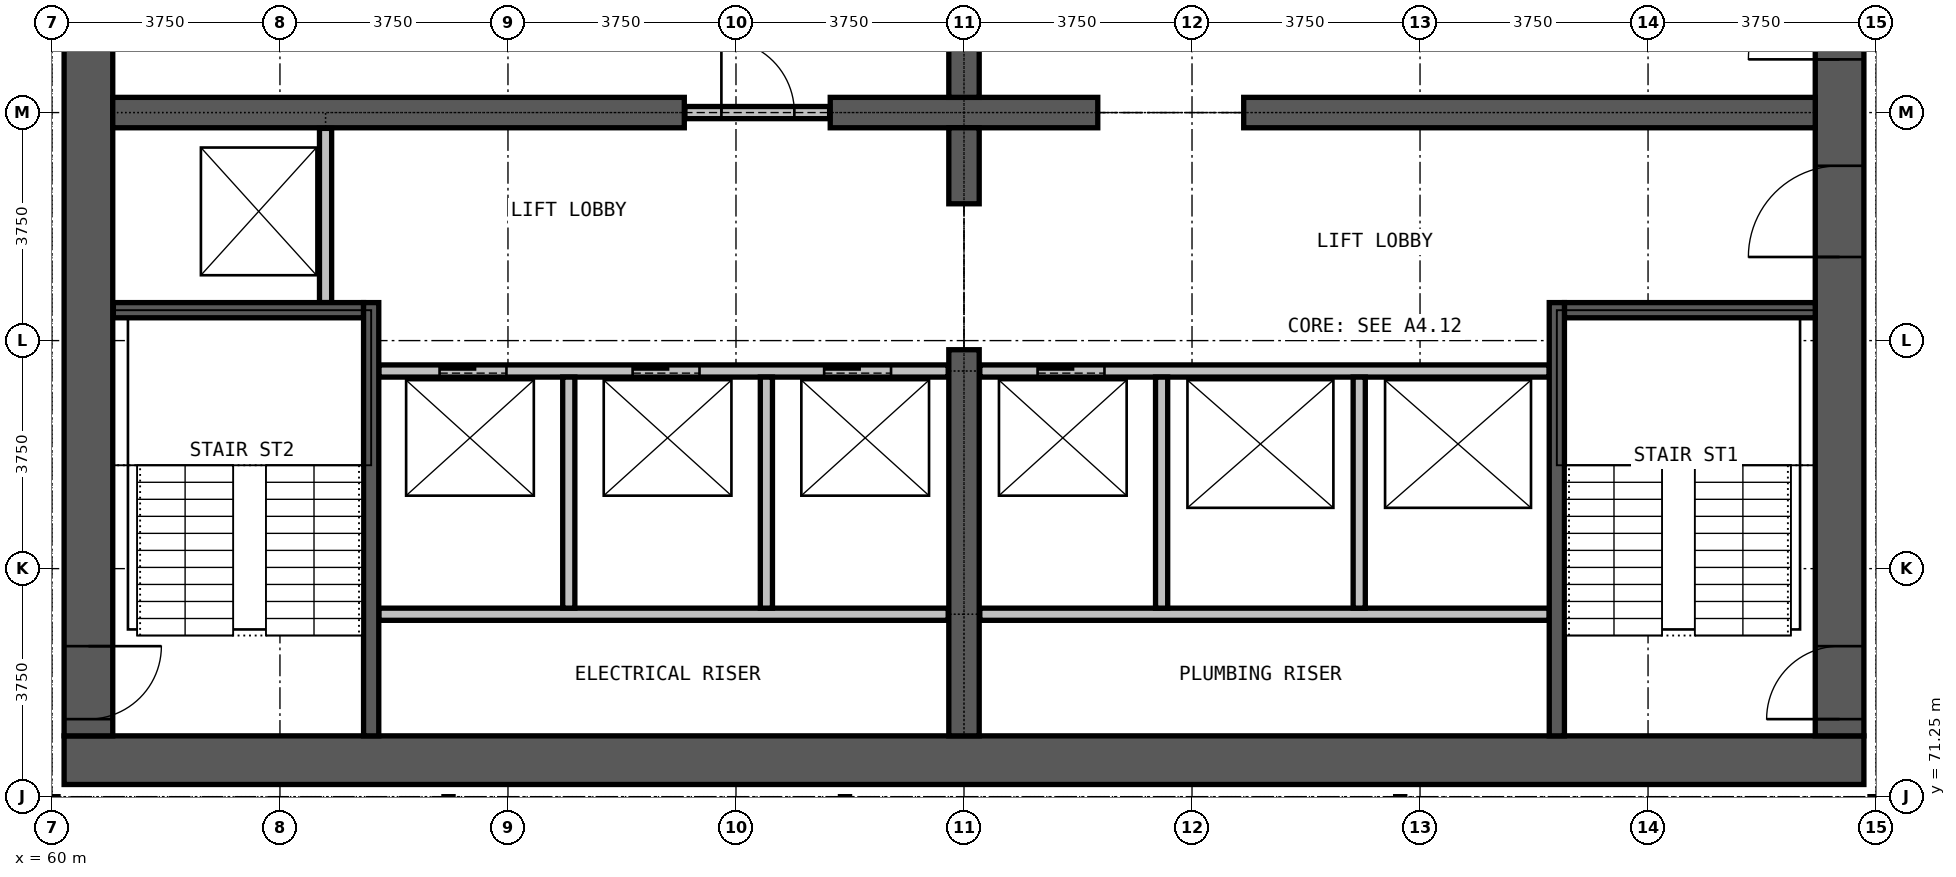
"""IFC4 building model, lengths in metres.
Left out: names, types, materials, properties, quantities, classifications, styles, units other than length and angle.
Written with IfcOpenShell. Run it as: python <this file> out.ifc"""

import sys

from ifc_helpers import new_model, si_unit, direction, frame, frame_2d, origin, place, context, subcontext, project, spatial, rectangle, extrude, element, fill, save


model = new_model("IFC4")
c1 = context("Model", 3, precision=1e-05, world=origin(), true_north=direction((0.0, 1.0)))
c2 = subcontext(c1, "Body", "Model", "MODEL_VIEW")
j1 = project(units=[si_unit("LENGTHUNIT", "METRE"), si_unit("PLANEANGLEUNIT", "RADIAN")], contexts=[c1])
p1 = place(None, origin())
s1 = spatial("IfcSite", under=j1, at=p1, CompositionType="ELEMENT")
p2 = place(p1, origin())
s2 = spatial("IfcBuilding", under=s1, at=p2, CompositionType="ELEMENT")
p3 = place(p2, frame((0.0, 0.0, 136.0)))
s3 = spatial("IfcBuildingStorey", under=s2, at=p3, CompositionType="ELEMENT", Elevation=136.0)
p4 = place(p3, frame((60.2, 71.85, 0.0), z_axis=(0.0, 0.0, 1.0), x_axis=(1.0, 0.0, 0.0)))
e1 = element("IfcWall", 1, at=p4, inside=s3, PredefinedType="SHEAR", context=c2, shape_type="SweptSolid", body=[
    extrude(rectangle(XDim=29.6, YDim=0.8, at=frame_2d((14.8, 0.0))), origin(), (0.0, 0.0, 1.0), 3.6),
])
p5 = place(p3, frame((89.4, 72.25, 0.0), z_axis=(0.0, 0.0, 1.0), x_axis=(0.0, 1.0, 0.0)))
e2 = element("IfcWall", 2, at=p5, inside=s3, PredefinedType="SHEAR", context=c2, shape_type="SweptSolid", body=[
    extrude(rectangle(XDim=20.5, YDim=0.8, at=frame_2d((10.25, 0.0))), origin(), (0.0, 0.0, 1.0), 3.6),
])
p6 = place(p5, frame((0.275, 0.0, 0.0)))
e3 = element("IfcOpeningElement", 3, at=p6, cuts=e2, PredefinedType="OPENING", context=c2, shape_type="SweptSolid", body=[
    extrude(rectangle(XDim=1.2, YDim=2.2, at=frame_2d((0.6, 1.1))), frame((0.0, 0.41, 0.0), z_axis=(0.0, -1.0, 0.0), x_axis=(1.0, 0.0, 0.0)), (0.0, 0.0, 1.0), 0.82),
])
p7 = place(p5, frame((13.775, 0.0, 0.0)))
e4 = element("IfcOpeningElement", 4, at=p7, cuts=e2, PredefinedType="OPENING", context=c2, shape_type="SweptSolid", body=[
    extrude(rectangle(XDim=1.2, YDim=2.2, at=frame_2d((0.6, 1.1))), frame((0.0, 0.41, 0.0), z_axis=(0.0, -1.0, 0.0), x_axis=(1.0, 0.0, 0.0)), (0.0, 0.0, 1.0), 0.82),
])
p8 = place(p5, frame((7.875, 0.0, 0.0)))
e5 = element("IfcOpeningElement", 5, at=p8, cuts=e2, PredefinedType="OPENING", context=c2, shape_type="SweptSolid", body=[
    extrude(rectangle(XDim=1.5, YDim=2.2, at=frame_2d((0.75, 1.1))), frame((0.0, 0.41, 0.0), z_axis=(0.0, -1.0, 0.0), x_axis=(1.0, 0.0, 0.0)), (0.0, 0.0, 1.0), 0.82),
])
p9 = place(p5, frame((11.125, 0.0, 0.0)))
e6 = element("IfcOpeningElement", 6, at=p9, cuts=e2, PredefinedType="OPENING", context=c2, shape_type="SweptSolid", body=[
    extrude(rectangle(XDim=1.5, YDim=2.2, at=frame_2d((0.75, 1.1))), frame((0.0, 0.41, 0.0), z_axis=(0.0, -1.0, 0.0), x_axis=(1.0, 0.0, 0.0)), (0.0, 0.0, 1.0), 0.82),
])
p10 = place(p3, frame((60.6, 92.75, 0.0), z_axis=(0.0, 0.0, 1.0), x_axis=(0.0, -1.0, 0.0)))
e7 = element("IfcWall", 7, at=p10, inside=s3, PredefinedType="SHEAR", context=c2, shape_type="SweptSolid", body=[
    extrude(rectangle(XDim=20.5, YDim=0.8, at=frame_2d((10.25, 0.0))), origin(), (0.0, 0.0, 1.0), 3.6),
])
p11 = place(p10, frame((19.025, 0.0, 0.0)))
e8 = element("IfcOpeningElement", 8, at=p11, cuts=e7, PredefinedType="OPENING", context=c2, shape_type="SweptSolid", body=[
    extrude(rectangle(XDim=1.2, YDim=2.2, at=frame_2d((0.6, 1.1))), frame((0.0, 0.41, 0.0), z_axis=(0.0, -1.0, 0.0), x_axis=(1.0, 0.0, 0.0)), (0.0, 0.0, 1.0), 0.82),
])
p12 = place(p10, frame((8.025, 0.0, 0.0)))
e9 = element("IfcOpeningElement", 9, at=p12, cuts=e7, PredefinedType="OPENING", context=c2, shape_type="SweptSolid", body=[
    extrude(rectangle(XDim=1.2, YDim=2.2, at=frame_2d((0.6, 1.1))), frame((0.0, 0.41, 0.0), z_axis=(0.0, -1.0, 0.0), x_axis=(1.0, 0.0, 0.0)), (0.0, 0.0, 1.0), 0.82),
])
p13 = place(p3, frame((61.0, 82.5, 0.0), z_axis=(0.0, 0.0, 1.0), x_axis=(1.0, 0.0, 0.0)))
e10 = element("IfcWall", 10, at=p13, inside=s3, PredefinedType="SHEAR", context=c2, shape_type="SweptSolid", body=[
    extrude(rectangle(XDim=9.4, YDim=0.5, at=frame_2d((4.7, 0.0))), origin(), (0.0, 0.0, 1.0), 3.6),
])
p14 = place(p3, frame((72.8, 82.5, 0.0), z_axis=(0.0, 0.0, 1.0), x_axis=(1.0, 0.0, 0.0)))
e11 = element("IfcWall", 11, at=p14, inside=s3, PredefinedType="SHEAR", context=c2, shape_type="SweptSolid", body=[
    extrude(rectangle(XDim=4.4, YDim=0.5, at=frame_2d((2.2, 0.0))), origin(), (0.0, 0.0, 1.0), 3.6),
])
p15 = place(p3, frame((79.6, 82.5, 0.0), z_axis=(0.0, 0.0, 1.0), x_axis=(1.0, 0.0, 0.0)))
e12 = element("IfcWall", 12, at=p15, inside=s3, PredefinedType="SHEAR", context=c2, shape_type="SweptSolid", body=[
    extrude(rectangle(XDim=9.4, YDim=0.5, at=frame_2d((4.7, 0.0))), origin(), (0.0, 0.0, 1.0), 3.6),
])
p16 = place(p3, frame((75.0, 72.25, 0.0), z_axis=(0.0, 0.0, 1.0), x_axis=(0.0, 1.0, 0.0)))
e13 = element("IfcWall", 13, at=p16, inside=s3, PredefinedType="SHEAR", context=c2, shape_type="SweptSolid", body=[
    extrude(rectangle(XDim=6.35, YDim=0.5, at=frame_2d((3.175, 0.0))), origin(), (0.0, 0.0, 1.0), 3.6),
])
for number, where, z_axis, x_axis in (
    (14, (75.0, 81.0, 0.0), (0.0, 0.0, 1.0), (0.0, 1.0, 0.0)),
    (15, (75.0, 82.75, 0.0), (0.0, 0.0, 1.0), (0.0, 1.0, 0.0)),
):
    element("IfcWall", number, at=place(p3, frame(where, z_axis=z_axis, x_axis=x_axis)), inside=s3, PredefinedType="SHEAR", context=c2, shape_type="SweptSolid", body=[
        extrude(rectangle(XDim=1.25, YDim=0.5, at=frame_2d((0.625, 0.0))), origin(), (0.0, 0.0, 1.0), 3.6),
    ])
p17 = place(p3, frame((70.41, 82.5, 0.0), z_axis=(0.0, 0.0, 1.0), x_axis=(1.0, 0.0, 0.0)))
e16 = element("IfcWall", 16, at=p17, inside=s3, PredefinedType="PARTITIONING", context=c2, shape_type="SweptSolid", body=[
    extrude(rectangle(XDim=2.38, YDim=0.2, at=frame_2d((1.19, 0.0))), origin(), (0.0, 0.0, 1.0), 2.4),
])
p18 = place(p17, frame((0.6, 0.0, 0.0)))
e17 = element("IfcOpeningElement", 17, at=p18, cuts=e16, PredefinedType="OPENING", context=c2, shape_type="SweptSolid", body=[
    extrude(rectangle(XDim=1.2, YDim=2.2, at=frame_2d((0.6, 1.1))), frame((0.0, 0.11, 0.0), z_axis=(0.0, -1.0, 0.0), x_axis=(1.0, 0.0, 0.0)), (0.0, 0.0, 1.0), 0.22),
])
for number, where, z_axis, x_axis in (
    (18, (65.375, 74.25, 0.0), (0.0, 0.0, 1.0), (1.0, 0.0, 0.0)),
    (19, (75.26, 74.25, 0.0), (0.0, 0.0, 1.0), (1.0, 0.0, 0.0)),
):
    element("IfcWall", number, at=place(p3, frame(where, z_axis=z_axis, x_axis=x_axis)), inside=s3, PredefinedType="PARTITIONING", context=c2, shape_type="SweptSolid", body=[
        extrude(rectangle(XDim=9.365, YDim=0.2, at=frame_2d((4.683, 0.0))), origin(), (0.0, 0.0, 1.0), 3.3),
    ])
p19 = place(p3, frame((65.375, 78.25, 0.0), z_axis=(0.0, 0.0, 1.0), x_axis=(1.0, 0.0, 0.0)))
e20 = element("IfcWall", 20, at=p19, inside=s3, PredefinedType="PARTITIONING", context=c2, shape_type="SweptSolid", body=[
    extrude(rectangle(XDim=9.365, YDim=0.2, at=frame_2d((4.683, 0.0))), origin(), (0.0, 0.0, 1.0), 3.3),
])
p20 = place(p19, frame((1.0, 0.0, 0.0)))
e21 = element("IfcOpeningElement", 21, at=p20, cuts=e20, PredefinedType="OPENING", context=c2, shape_type="SweptSolid", body=[
    extrude(rectangle(XDim=1.1, YDim=2.2, at=frame_2d((0.55, 1.1))), frame((0.0, 0.11, 0.0), z_axis=(0.0, -1.0, 0.0), x_axis=(1.0, 0.0, 0.0)), (0.0, 0.0, 1.0), 0.22),
])
p21 = place(p19, frame((4.175, 0.0, 0.0)))
e22 = element("IfcOpeningElement", 22, at=p21, cuts=e20, PredefinedType="OPENING", context=c2, shape_type="SweptSolid", body=[
    extrude(rectangle(XDim=1.1, YDim=2.2, at=frame_2d((0.55, 1.1))), frame((0.0, 0.11, 0.0), z_axis=(0.0, -1.0, 0.0), x_axis=(1.0, 0.0, 0.0)), (0.0, 0.0, 1.0), 0.22),
])
p22 = place(p19, frame((7.325, 0.0, 0.0)))
e23 = element("IfcOpeningElement", 23, at=p22, cuts=e20, PredefinedType="OPENING", context=c2, shape_type="SweptSolid", body=[
    extrude(rectangle(XDim=1.1, YDim=2.2, at=frame_2d((0.55, 1.1))), frame((0.0, 0.11, 0.0), z_axis=(0.0, -1.0, 0.0), x_axis=(1.0, 0.0, 0.0)), (0.0, 0.0, 1.0), 0.22),
])
p23 = place(p3, frame((75.26, 78.25, 0.0), z_axis=(0.0, 0.0, 1.0), x_axis=(1.0, 0.0, 0.0)))
e24 = element("IfcWall", 24, at=p23, inside=s3, PredefinedType="PARTITIONING", context=c2, shape_type="SweptSolid", body=[
    extrude(rectangle(XDim=9.365, YDim=0.2, at=frame_2d((4.683, 0.0))), origin(), (0.0, 0.0, 1.0), 3.3),
])
p24 = place(p23, frame((0.95, 0.0, 0.0)))
e25 = element("IfcOpeningElement", 25, at=p24, cuts=e24, PredefinedType="OPENING", context=c2, shape_type="SweptSolid", body=[
    extrude(rectangle(XDim=1.1, YDim=2.2, at=frame_2d((0.55, 1.1))), frame((0.0, 0.11, 0.0), z_axis=(0.0, -1.0, 0.0), x_axis=(1.0, 0.0, 0.0)), (0.0, 0.0, 1.0), 0.22),
])
p25 = place(p3, frame((64.5, 79.375, 0.0), z_axis=(0.0, 0.0, 1.0), x_axis=(0.0, 1.0, 0.0)))
e26 = element("IfcWall", 26, at=p25, inside=s3, PredefinedType="PARTITIONING", context=c2, shape_type="SweptSolid", body=[
    extrude(rectangle(XDim=2.865, YDim=0.2, at=frame_2d((1.433, 0.0))), origin(), (0.0, 0.0, 1.0), 3.3),
])
for number, where, z_axis, x_axis in (
    (27, (68.5, 74.35, 0.0), (0.0, 0.0, 1.0), (0.0, 1.0, 0.0)),
    (28, (71.75, 74.35, 0.0), (0.0, 0.0, 1.0), (0.0, 1.0, 0.0)),
    (29, (78.25, 74.35, 0.0), (0.0, 0.0, 1.0), (0.0, 1.0, 0.0)),
    (30, (81.5, 74.35, 0.0), (0.0, 0.0, 1.0), (0.0, 1.0, 0.0)),
):
    element("IfcWall", number, at=place(p3, frame(where, z_axis=z_axis, x_axis=x_axis)), inside=s3, PredefinedType="PARTITIONING", context=c2, shape_type="SweptSolid", body=[
        extrude(rectangle(XDim=3.8, YDim=0.2, at=frame_2d((1.9, 0.0))), origin(), (0.0, 0.0, 1.0), 3.3),
    ])
p26 = place(p3, frame((61.01, 79.25, 0.0), z_axis=(0.0, 0.0, 1.0), x_axis=(1.0, 0.0, 0.0)))
e31 = element("IfcWall", 31, at=p26, inside=s3, PredefinedType="PARTITIONING", context=c2, shape_type="SweptSolid", body=[
    extrude(rectangle(XDim=4.115, YDim=0.25, at=frame_2d((2.058, 0.0))), origin(), (0.0, 0.0, 1.0), 3.3),
])
p27 = place(p3, frame((84.875, 79.25, 0.0), z_axis=(0.0, 0.0, 1.0), x_axis=(1.0, 0.0, 0.0)))
e32 = element("IfcWall", 32, at=p27, inside=s3, PredefinedType="PARTITIONING", context=c2, shape_type="SweptSolid", body=[
    extrude(rectangle(XDim=4.125, YDim=0.25, at=frame_2d((2.062, 0.0))), origin(), (0.0, 0.0, 1.0), 3.3),
])
for number, where, z_axis, x_axis in (
    (33, (65.25, 72.25, 0.0), (0.0, 0.0, 1.0), (0.0, 1.0, 0.0)),
    (34, (84.75, 72.25, 0.0), (0.0, 0.0, 1.0), (0.0, 1.0, 0.0)),
):
    element("IfcWall", number, at=place(p3, frame(where, z_axis=z_axis, x_axis=x_axis)), inside=s3, PredefinedType="PARTITIONING", context=c2, shape_type="SweptSolid", body=[
        extrude(rectangle(XDim=7.125, YDim=0.25, at=frame_2d((3.562, 0.0))), origin(), (0.0, 0.0, 1.0), 3.3),
    ])
p28 = place(p20, origin())
e35 = element("IfcDoor", 35, at=p28, inside=s3, OperationType="DOUBLE_DOOR_SLIDING", PredefinedType="DOOR", context=c2, shape_type="SweptSolid", body=[
    extrude(rectangle(XDim=1.1, YDim=2.2, at=frame_2d((0.55, 1.1))), frame((0.0, 0.025, 0.0), z_axis=(0.0, -1.0, 0.0), x_axis=(1.0, 0.0, 0.0)), (0.0, 0.0, 1.0), 0.05),
])
fill(e21, e35)
p29 = place(p21, origin())
e36 = element("IfcDoor", 36, at=p29, inside=s3, OperationType="DOUBLE_DOOR_SLIDING", PredefinedType="DOOR", context=c2, shape_type="SweptSolid", body=[
    extrude(rectangle(XDim=1.1, YDim=2.2, at=frame_2d((0.55, 1.1))), frame((0.0, 0.025, 0.0), z_axis=(0.0, -1.0, 0.0), x_axis=(1.0, 0.0, 0.0)), (0.0, 0.0, 1.0), 0.05),
])
fill(e22, e36)
p30 = place(p22, origin())
e37 = element("IfcDoor", 37, at=p30, inside=s3, OperationType="DOUBLE_DOOR_SLIDING", PredefinedType="DOOR", context=c2, shape_type="SweptSolid", body=[
    extrude(rectangle(XDim=1.1, YDim=2.2, at=frame_2d((0.55, 1.1))), frame((0.0, 0.025, 0.0), z_axis=(0.0, -1.0, 0.0), x_axis=(1.0, 0.0, 0.0)), (0.0, 0.0, 1.0), 0.05),
])
fill(e23, e37)
p31 = place(p24, origin())
e38 = element("IfcDoor", 38, at=p31, inside=s3, OperationType="DOUBLE_DOOR_SLIDING", PredefinedType="DOOR", context=c2, shape_type="SweptSolid", body=[
    extrude(rectangle(XDim=1.1, YDim=2.2, at=frame_2d((0.55, 1.1))), frame((0.0, 0.025, 0.0), z_axis=(0.0, -1.0, 0.0), x_axis=(1.0, 0.0, 0.0)), (0.0, 0.0, 1.0), 0.05),
])
fill(e25, e38)
p32 = place(p18, origin())
e39 = element("IfcDoor", 39, at=p32, inside=s3, OperationType="SINGLE_SWING_LEFT", PredefinedType="DOOR", context=c2, shape_type="SweptSolid", body=[
    extrude(rectangle(XDim=1.2, YDim=2.2, at=frame_2d((0.6, 1.1))), frame((0.0, 0.025, 0.0), z_axis=(0.0, -1.0, 0.0), x_axis=(1.0, 0.0, 0.0)), (0.0, 0.0, 1.0), 0.05),
])
fill(e17, e39)
p33 = place(p6, origin())
e40 = element("IfcDoor", 40, at=p33, inside=s3, OperationType="SINGLE_SWING_LEFT", PredefinedType="DOOR", context=c2, shape_type="SweptSolid", body=[
    extrude(rectangle(XDim=1.2, YDim=2.2, at=frame_2d((0.6, 1.1))), frame((0.0, 0.025, 0.0), z_axis=(0.0, -1.0, 0.0), x_axis=(1.0, 0.0, 0.0)), (0.0, 0.0, 1.0), 0.05),
])
fill(e3, e40)
p34 = place(p11, origin())
e41 = element("IfcDoor", 41, at=p34, inside=s3, OperationType="SINGLE_SWING_LEFT", PredefinedType="DOOR", context=c2, shape_type="SweptSolid", body=[
    extrude(rectangle(XDim=1.2, YDim=2.2, at=frame_2d((0.6, 1.1))), frame((0.0, 0.025, 0.0), z_axis=(0.0, -1.0, 0.0), x_axis=(1.0, 0.0, 0.0)), (0.0, 0.0, 1.0), 0.05),
])
fill(e8, e41)
p35 = place(p8, origin())
e42 = element("IfcDoor", 42, at=p35, inside=s3, OperationType="DOUBLE_DOOR_SINGLE_SWING", PredefinedType="DOOR", context=c2, shape_type="SweptSolid", body=[
    extrude(rectangle(XDim=1.5, YDim=2.2, at=frame_2d((0.75, 1.1))), frame((0.0, 0.025, 0.0), z_axis=(0.0, -1.0, 0.0), x_axis=(1.0, 0.0, 0.0)), (0.0, 0.0, 1.0), 0.05),
])
fill(e5, e42)
p36 = place(p9, origin())
e43 = element("IfcDoor", 43, at=p36, inside=s3, OperationType="DOUBLE_DOOR_SINGLE_SWING", PredefinedType="DOOR", context=c2, shape_type="SweptSolid", body=[
    extrude(rectangle(XDim=1.5, YDim=2.2, at=frame_2d((0.75, 1.1))), frame((0.0, 0.025, 0.0), z_axis=(0.0, -1.0, 0.0), x_axis=(1.0, 0.0, 0.0)), (0.0, 0.0, 1.0), 0.05),
])
fill(e6, e43)
save(model, sys.argv[1])
